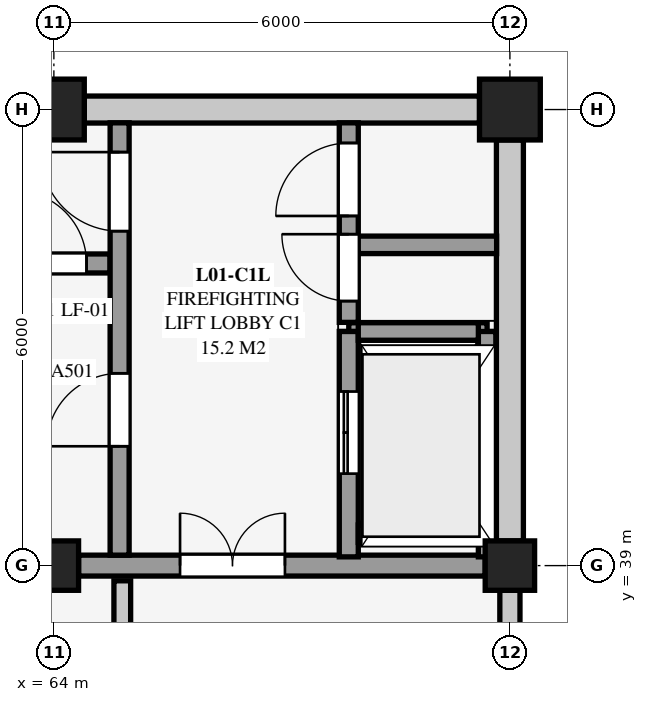
"""IFC4 building model, lengths in metres.
Left out: names, types, materials, properties, quantities, classifications, styles, units other than length and angle.
Written with IfcOpenShell. Run it as: python <this file> out.ifc"""

import sys

from ifc_helpers import new_model, si_unit, direction, frame, frame_2d, origin, origin_2d, place, context, subcontext, project, spatial, rectangle, extrude, element, fill, save


model = new_model("IFC4")
c1 = context("Model", 3, precision=1e-05, world=origin(), true_north=direction((0.0, 1.0)))
c2 = subcontext(c1, "Body", "Model", "MODEL_VIEW")
j1 = project(units=[si_unit("LENGTHUNIT", "METRE"), si_unit("PLANEANGLEUNIT", "RADIAN")], contexts=[c1])
p1 = place(None, origin())
s1 = spatial("IfcSite", under=j1, at=p1, CompositionType="ELEMENT")
p2 = place(p1, origin())
s2 = spatial("IfcBuilding", under=s1, at=p2, CompositionType="ELEMENT")
p3 = place(p2, origin())
s3 = spatial("IfcBuildingStorey", under=s2, at=p3, CompositionType="ELEMENT", Elevation=0.0)
p4 = place(p3, frame((64.0, 39.0, 0.0), z_axis=(0.0, 0.0, 1.0), x_axis=(1.0, 0.0, 0.0)))
e1 = element("IfcColumn", 1, at=p4, inside=s3, PredefinedType="COLUMN", context=c2, shape_type="SweptSolid", body=[
    extrude(rectangle(XDim=0.65, YDim=0.65, at=origin_2d()), origin(), (0.0, 0.0, 1.0), 4.5),
])
p5 = place(p3, frame((64.0, 45.0, 0.0), z_axis=(0.0, 0.0, 1.0), x_axis=(1.0, 0.0, 0.0)))
e2 = element("IfcColumn", 2, at=p5, inside=s3, PredefinedType="COLUMN", context=c2, shape_type="SweptSolid", body=[
    extrude(rectangle(XDim=0.8, YDim=0.8, at=origin_2d()), origin(), (0.0, 0.0, 1.0), 4.5),
])
p6 = place(p3, frame((70.0, 39.0, 0.0), z_axis=(0.0, 0.0, 1.0), x_axis=(1.0, 0.0, 0.0)))
e3 = element("IfcColumn", 3, at=p6, inside=s3, PredefinedType="COLUMN", context=c2, shape_type="SweptSolid", body=[
    extrude(rectangle(XDim=0.65, YDim=0.65, at=origin_2d()), origin(), (0.0, 0.0, 1.0), 4.5),
])
p7 = place(p3, frame((70.0, 45.0, 0.0), z_axis=(0.0, 0.0, 1.0), x_axis=(1.0, 0.0, 0.0)))
e4 = element("IfcColumn", 4, at=p7, inside=s3, PredefinedType="COLUMN", context=c2, shape_type="SweptSolid", body=[
    extrude(rectangle(XDim=0.8, YDim=0.8, at=origin_2d()), origin(), (0.0, 0.0, 1.0), 4.5),
])
p8 = place(p3, frame((70.0, 38.675, 0.0), z_axis=(0.0, 0.0, 1.0), x_axis=(0.0, -1.0, 0.0)))
e5 = element("IfcWall", 5, at=p8, inside=s3, PredefinedType="SOLIDWALL", context=c2, shape_type="SweptSolid", body=[
    extrude(rectangle(XDim=5.325, YDim=0.265, at=frame_2d((2.663, 0.0))), origin(), (0.0, 0.0, 1.0), 3.502),
])
p9 = place(p8, frame((1.938, 0.0, 1.3)))
e6 = element("IfcOpeningElement", 6, at=p9, cuts=e5, PredefinedType="OPENING", context=c2, shape_type="SweptSolid", body=[
    extrude(rectangle(XDim=1.45, YDim=1.45, at=frame_2d((0.725, 0.725))), frame((0.0, 0.142, 0.0), z_axis=(0.0, -1.0, 0.0), x_axis=(1.0, 0.0, 0.0)), (0.0, 0.0, 1.0), 0.285),
])
p10 = place(p3, frame((64.4, 45.0, 0.0), z_axis=(0.0, 0.0, 1.0), x_axis=(1.0, 0.0, 0.0)))
e7 = element("IfcWall", 7, at=p10, inside=s3, PredefinedType="SOLIDWALL", context=c2, shape_type="SweptSolid", body=[
    extrude(rectangle(XDim=5.2, YDim=0.355, at=frame_2d((2.6, 0.0))), origin(), (0.0, 0.0, 1.0), 3.697),
])
p11 = place(p3, frame((70.0, 44.6, 0.0), z_axis=(0.0, 0.0, 1.0), x_axis=(0.0, -1.0, 0.0)))
e8 = element("IfcWall", 8, at=p11, inside=s3, PredefinedType="SOLIDWALL", context=c2, shape_type="SweptSolid", body=[
    extrude(rectangle(XDim=5.275, YDim=0.355, at=frame_2d((2.638, 0.0))), origin(), (0.0, 0.0, 1.0), 3.756),
])
p12 = place(p3, frame((67.88, 39.42, -1.05), z_axis=(0.0, 0.0, 1.0), x_axis=(1.0, 0.0, 0.0)))
e9 = element("IfcWall", 9, at=p12, inside=s3, PredefinedType="SHEAR", context=c2, shape_type="SweptSolid", body=[
    extrude(rectangle(XDim=1.82, YDim=0.23, at=frame_2d((0.91, 0.0))), origin(), (0.0, 0.0, 1.0), 1.05),
])
p13 = place(p3, frame((69.7, 39.42, -1.05), z_axis=(0.0, 0.0, 1.0), x_axis=(0.0, 1.0, 0.0)))
e10 = element("IfcWall", 10, at=p13, inside=s3, PredefinedType="SHEAR", context=c2, shape_type="SweptSolid", body=[
    extrude(rectangle(XDim=2.66, YDim=0.23, at=frame_2d((1.33, 0.0))), origin(), (0.0, 0.0, 1.0), 1.05),
])
p14 = place(p3, frame((69.7, 42.08, -1.05), z_axis=(0.0, 0.0, 1.0), x_axis=(-1.0, 0.0, 0.0)))
e11 = element("IfcWall", 11, at=p14, inside=s3, PredefinedType="SHEAR", context=c2, shape_type="SweptSolid", body=[
    extrude(rectangle(XDim=1.82, YDim=0.23, at=frame_2d((0.91, 0.0))), origin(), (0.0, 0.0, 1.0), 1.05),
])
p15 = place(p3, frame((67.88, 42.08, -1.05), z_axis=(0.0, 0.0, 1.0), x_axis=(0.0, -1.0, 0.0)))
e12 = element("IfcWall", 12, at=p15, inside=s3, PredefinedType="SHEAR", context=c2, shape_type="SweptSolid", body=[
    extrude(rectangle(XDim=2.66, YDim=0.23, at=frame_2d((1.33, 0.0))), origin(), (0.0, 0.0, 1.0), 1.05),
])
p16 = place(p3, frame((64.325, 39.0, 0.0), z_axis=(0.0, 0.0, 1.0), x_axis=(1.0, 0.0, 0.0)))
e13 = element("IfcWall", 13, at=p16, inside=s3, PredefinedType="SHEAR", context=c2, shape_type="SweptSolid", body=[
    extrude(rectangle(XDim=5.35, YDim=0.275, at=frame_2d((2.675, 0.0))), origin(), (0.0, 0.0, 1.0), 4.24),
])
p17 = place(p16, frame((1.335, 0.0, 0.0)))
e14 = element("IfcOpeningElement", 14, at=p17, cuts=e13, PredefinedType="OPENING", context=c2, shape_type="SweptSolid", body=[
    extrude(rectangle(XDim=1.38, YDim=2.16, at=frame_2d((0.69, 1.08))), frame((0.0, 0.147, 0.0), z_axis=(0.0, -1.0, 0.0), x_axis=(1.0, 0.0, 0.0)), (0.0, 0.0, 1.0), 0.295),
])
p18 = place(p3, frame((63.16, 42.975, 0.0), z_axis=(0.0, 0.0, 1.0), x_axis=(1.0, 0.0, 0.0)))
e15 = element("IfcWall", 15, at=p18, inside=s3, PredefinedType="SHEAR", context=c2, shape_type="SweptSolid", body=[
    extrude(rectangle(XDim=1.58, YDim=0.25, at=frame_2d((0.79, 0.0))), origin(), (0.0, 0.0, 1.0), 4.24),
])
p19 = place(p18, frame((0.31, 0.0, 0.0)))
e16 = element("IfcOpeningElement", 16, at=p19, cuts=e15, PredefinedType="OPENING", context=c2, shape_type="SweptSolid", body=[
    extrude(rectangle(XDim=0.96, YDim=2.12, at=frame_2d((0.48, 1.06))), frame((0.0, 0.135, 0.0), z_axis=(0.0, -1.0, 0.0), x_axis=(1.0, 0.0, 0.0)), (0.0, 0.0, 1.0), 0.27),
])
p20 = place(p3, frame((64.865, 39.137, 0.0), z_axis=(0.0, 0.0, 1.0), x_axis=(0.0, 1.0, 0.0)))
e17 = element("IfcWall", 17, at=p20, inside=s3, PredefinedType="SHEAR", context=c2, shape_type="SweptSolid", body=[
    extrude(rectangle(XDim=5.688, YDim=0.25, at=frame_2d((2.844, 0.0))), origin(), (0.0, 0.0, 1.0), 4.24),
])
p21 = place(p20, frame((4.262, 0.0, 0.0)))
e18 = element("IfcOpeningElement", 18, at=p21, cuts=e17, PredefinedType="OPENING", context=c2, shape_type="SweptSolid", body=[
    extrude(rectangle(XDim=1.04, YDim=2.14, at=frame_2d((0.52, 1.07))), frame((0.0, 0.135, 0.0), z_axis=(0.0, -1.0, 0.0), x_axis=(1.0, 0.0, 0.0)), (0.0, 0.0, 1.0), 0.27),
])
p22 = place(p20, frame((1.433, 0.0, 0.0)))
e19 = element("IfcOpeningElement", 19, at=p22, cuts=e17, PredefinedType="OPENING", context=c2, shape_type="SweptSolid", body=[
    extrude(rectangle(XDim=0.96, YDim=2.12, at=frame_2d((0.48, 1.06))), frame((0.0, 0.135, 0.0), z_axis=(0.0, -1.0, 0.0), x_axis=(1.0, 0.0, 0.0)), (0.0, 0.0, 1.0), 0.27),
])
p23 = place(p3, frame((67.88, 39.115, 0.0), z_axis=(0.0, 0.0, 1.0), x_axis=(0.0, 1.0, 0.0)))
e20 = element("IfcWall", 20, at=p23, inside=s3, PredefinedType="SHEAR", context=c2, shape_type="SweptSolid", body=[
    extrude(rectangle(XDim=2.965, YDim=0.25, at=frame_2d((1.482, 0.0))), origin(), (0.0, 0.0, 1.0), 4.5),
])
p24 = place(p23, frame((1.095, 0.0, 0.0)))
e21 = element("IfcOpeningElement", 21, at=p24, cuts=e20, PredefinedType="OPENING", context=c2, shape_type="SweptSolid", body=[
    extrude(rectangle(XDim=1.08, YDim=2.15, at=frame_2d((0.54, 1.075))), frame((0.0, 0.135, 0.0), z_axis=(0.0, -1.0, 0.0), x_axis=(1.0, 0.0, 0.0)), (0.0, 0.0, 1.0), 0.27),
])
p25 = place(p3, frame((68.005, 39.42, 0.0), z_axis=(0.0, 0.0, 1.0), x_axis=(1.0, 0.0, 0.0)))
e22 = element("IfcWall", 22, at=p25, inside=s3, PredefinedType="SHEAR", context=c2, shape_type="SweptSolid", body=[
    extrude(rectangle(XDim=1.58, YDim=0.23, at=frame_2d((0.79, 0.0))), origin(), (0.0, 0.0, 1.0), 4.5),
])
p26 = place(p3, frame((69.7, 39.115, 0.0), z_axis=(0.0, 0.0, 1.0), x_axis=(0.0, 1.0, 0.0)))
e23 = element("IfcWall", 23, at=p26, inside=s3, PredefinedType="SHEAR", context=c2, shape_type="SweptSolid", body=[
    extrude(rectangle(XDim=2.965, YDim=0.23, at=frame_2d((1.482, 0.0))), origin(), (0.0, 0.0, 1.0), 4.5),
])
p27 = place(p3, frame((68.005, 42.08, 0.0), z_axis=(0.0, 0.0, 1.0), x_axis=(1.0, 0.0, 0.0)))
e24 = element("IfcWall", 24, at=p27, inside=s3, PredefinedType="SHEAR", context=c2, shape_type="SweptSolid", body=[
    extrude(rectangle(XDim=1.58, YDim=0.23, at=frame_2d((0.79, 0.0))), origin(), (0.0, 0.0, 1.0), 4.5),
])
p28 = place(p3, frame((67.88, 42.2, 0.0), z_axis=(0.0, 0.0, 1.0), x_axis=(0.0, 1.0, 0.0)))
e25 = element("IfcWall", 25, at=p28, inside=s3, PredefinedType="SHEAR", context=c2, shape_type="SweptSolid", body=[
    extrude(rectangle(XDim=2.625, YDim=0.25, at=frame_2d((1.312, 0.0))), origin(), (0.0, 0.0, 1.0), 4.24),
])
p29 = place(p28, frame((0.28, 0.0, 0.0)))
e26 = element("IfcOpeningElement", 26, at=p29, cuts=e25, PredefinedType="OPENING", context=c2, shape_type="SweptSolid", body=[
    extrude(rectangle(XDim=0.88, YDim=2.08, at=frame_2d((0.44, 1.04))), frame((0.0, 0.135, 0.0), z_axis=(0.0, -1.0, 0.0), x_axis=(1.0, 0.0, 0.0)), (0.0, 0.0, 1.0), 0.27),
])
p30 = place(p28, frame((1.4, 0.0, 0.0)))
e27 = element("IfcOpeningElement", 27, at=p30, cuts=e25, PredefinedType="OPENING", context=c2, shape_type="SweptSolid", body=[
    extrude(rectangle(XDim=0.96, YDim=2.12, at=frame_2d((0.48, 1.06))), frame((0.0, 0.135, 0.0), z_axis=(0.0, -1.0, 0.0), x_axis=(1.0, 0.0, 0.0)), (0.0, 0.0, 1.0), 0.27),
])
p31 = place(p3, frame((68.005, 43.22, 0.0), z_axis=(0.0, 0.0, 1.0), x_axis=(1.0, 0.0, 0.0)))
e28 = element("IfcWall", 28, at=p31, inside=s3, PredefinedType="SHEAR", context=c2, shape_type="SweptSolid", body=[
    extrude(rectangle(XDim=1.82, YDim=0.23, at=frame_2d((0.91, 0.0))), origin(), (0.0, 0.0, 1.0), 4.24),
])
p32 = place(p3, frame((64.9, 29.2, 0.0), z_axis=(0.0, 0.0, 1.0), x_axis=(0.0, 1.0, 0.0)))
e29 = element("IfcWall", 29, at=p32, inside=s3, PredefinedType="SOLIDWALL", context=c2, shape_type="SweptSolid", body=[
    extrude(rectangle(XDim=9.6, YDim=0.22, at=frame_2d((4.8, 0.0))), origin(), (0.0, 0.0, 1.0), 4.252),
])
p33 = place(p32, frame((4.61, 0.0, 0.0)))
e30 = element("IfcOpeningElement", 30, at=p33, cuts=e29, PredefinedType="OPENING", context=c2, shape_type="SweptSolid", body=[
    extrude(rectangle(XDim=1.58, YDim=2.2, at=frame_2d((0.79, 1.1))), frame((0.0, 0.12, 0.0), z_axis=(0.0, -1.0, 0.0), x_axis=(1.0, 0.0, 0.0)), (0.0, 0.0, 1.0), 0.24),
])
p34 = place(p17, origin())
e31 = element("IfcDoor", 31, at=p34, inside=s3, OperationType="DOUBLE_DOOR_SINGLE_SWING", PredefinedType="DOOR", context=c2, shape_type="SweptSolid", body=[
    extrude(rectangle(XDim=1.38, YDim=2.16, at=frame_2d((0.69, 1.08))), frame((0.0, 0.025, 0.0), z_axis=(0.0, -1.0, 0.0), x_axis=(1.0, 0.0, 0.0)), (0.0, 0.0, 1.0), 0.05),
])
fill(e14, e31)
p35 = place(p19, origin())
e32 = element("IfcDoor", 32, at=p35, inside=s3, OperationType="SINGLE_SWING_LEFT", PredefinedType="DOOR", context=c2, shape_type="SweptSolid", body=[
    extrude(rectangle(XDim=0.96, YDim=2.12, at=frame_2d((0.48, 1.06))), frame((0.0, 0.025, 0.0), z_axis=(0.0, -1.0, 0.0), x_axis=(1.0, 0.0, 0.0)), (0.0, 0.0, 1.0), 0.05),
])
fill(e16, e32)
p36 = place(p21, origin())
e33 = element("IfcDoor", 33, at=p36, inside=s3, OperationType="SINGLE_SWING_RIGHT", PredefinedType="DOOR", context=c2, shape_type="SweptSolid", body=[
    extrude(rectangle(XDim=1.04, YDim=2.14, at=frame_2d((0.52, 1.07))), frame((0.0, 0.025, 0.0), z_axis=(0.0, -1.0, 0.0), x_axis=(1.0, 0.0, 0.0)), (0.0, 0.0, 1.0), 0.05),
])
fill(e18, e33)
p37 = place(p22, origin())
e34 = element("IfcDoor", 34, at=p37, inside=s3, OperationType="SINGLE_SWING_LEFT", PredefinedType="DOOR", context=c2, shape_type="SweptSolid", body=[
    extrude(rectangle(XDim=0.96, YDim=2.12, at=frame_2d((0.48, 1.06))), frame((0.0, 0.025, 0.0), z_axis=(0.0, -1.0, 0.0), x_axis=(1.0, 0.0, 0.0)), (0.0, 0.0, 1.0), 0.05),
])
fill(e19, e34)
p38 = place(p24, origin())
e35 = element("IfcDoor", 35, at=p38, inside=s3, OperationType="DOUBLE_DOOR_SLIDING", PredefinedType="DOOR", context=c2, shape_type="SweptSolid", body=[
    extrude(rectangle(XDim=1.08, YDim=2.15, at=frame_2d((0.54, 1.075))), frame((0.0, 0.025, 0.0), z_axis=(0.0, -1.0, 0.0), x_axis=(1.0, 0.0, 0.0)), (0.0, 0.0, 1.0), 0.05),
])
fill(e21, e35)
p39 = place(p29, origin())
e36 = element("IfcDoor", 36, at=p39, inside=s3, OperationType="SINGLE_SWING_RIGHT", PredefinedType="DOOR", context=c2, shape_type="SweptSolid", body=[
    extrude(rectangle(XDim=0.88, YDim=2.08, at=frame_2d((0.44, 1.04))), frame((0.0, 0.025, 0.0), z_axis=(0.0, -1.0, 0.0), x_axis=(1.0, 0.0, 0.0)), (0.0, 0.0, 1.0), 0.05),
])
fill(e26, e36)
p40 = place(p30, origin())
e37 = element("IfcDoor", 37, at=p40, inside=s3, OperationType="SINGLE_SWING_LEFT", PredefinedType="DOOR", context=c2, shape_type="SweptSolid", body=[
    extrude(rectangle(XDim=0.96, YDim=2.12, at=frame_2d((0.48, 1.06))), frame((0.0, 0.025, 0.0), z_axis=(0.0, -1.0, 0.0), x_axis=(1.0, 0.0, 0.0)), (0.0, 0.0, 1.0), 0.05),
])
fill(e27, e37)
save(model, sys.argv[1])
